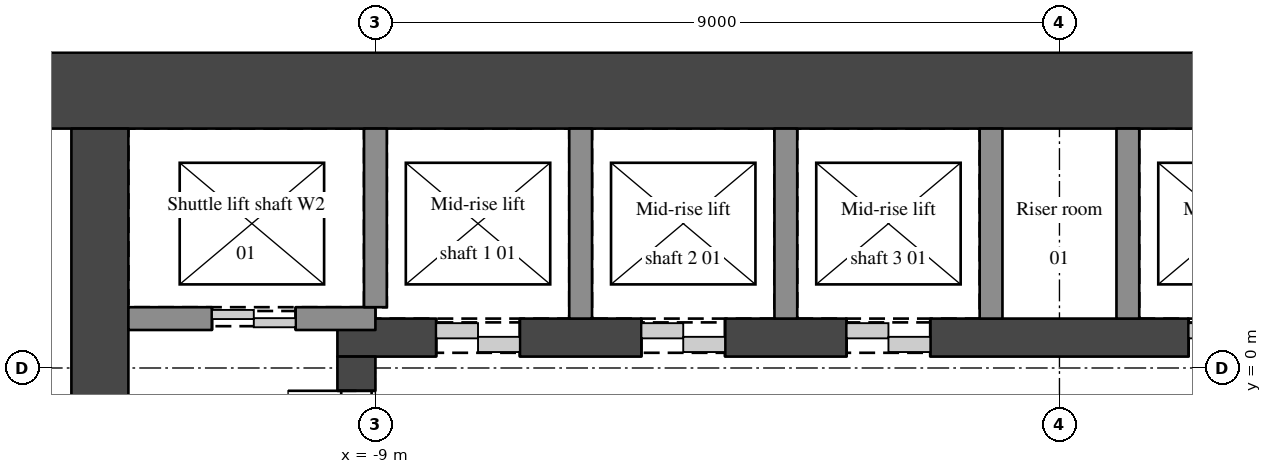
"""IFC4 building model, lengths in metres.
Left out: names, types, materials, properties, quantities, classifications, styles, units other than length and angle.
Written with IfcOpenShell. Run it as: python <this file> out.ifc"""

import sys

from ifc_helpers import new_model, si_unit, direction, frame, frame_2d, origin, place, context, subcontext, project, spatial, rectangle, extrude, element, fill, save


model = new_model("IFC4")
c1 = context("Model", 3, precision=1e-05, world=origin(), true_north=direction((0.0, 1.0)))
c2 = subcontext(c1, "Body", "Model", "MODEL_VIEW")
j1 = project(units=[si_unit("LENGTHUNIT", "METRE"), si_unit("PLANEANGLEUNIT", "RADIAN")], contexts=[c1])
p1 = place(None, origin())
s1 = spatial("IfcSite", under=j1, at=p1, CompositionType="ELEMENT")
p2 = place(p1, origin())
s2 = spatial("IfcBuilding", under=s1, at=p2, CompositionType="ELEMENT")
p3 = place(p2, frame((0.0, 0.0, 108.9)))
s3 = spatial("IfcBuildingStorey", under=s2, at=p3, CompositionType="ELEMENT", Elevation=108.9)
p4 = place(p3, frame((-15.0, 3.65, 0.0), z_axis=(0.0, 0.0, 1.0), x_axis=(1.0, 0.0, 0.0)))
e1 = element("IfcWall", 1, at=p4, inside=s3, PredefinedType="SHEAR", context=c2, shape_type="SweptSolid", body=[
    extrude(rectangle(XDim=30.0, YDim=1.0, at=frame_2d((15.0, 0.0))), origin(), (0.0, 0.0, 1.0), 5.4),
])
p5 = place(p3, frame((-12.625, -11.5, 0.0), z_axis=(0.0, 0.0, 1.0), x_axis=(0.0, 1.0, 0.0)))
e2 = element("IfcWall", 2, at=p5, inside=s3, PredefinedType="SHEAR", context=c2, shape_type="SweptSolid", body=[
    extrude(rectangle(XDim=14.65, YDim=0.75, at=frame_2d((7.325, 0.0))), origin(), (0.0, 0.0, 1.0), 5.4),
])
p6 = place(p5, frame((10.05, 0.0, 0.0)))
e3 = element("IfcOpeningElement", 3, at=p6, cuts=e2, PredefinedType="OPENING", context=c2, shape_type="SweptSolid", body=[
    extrude(rectangle(XDim=0.9, YDim=2.1, at=frame_2d((0.45, 1.05))), frame((0.0, 0.385, 0.0), z_axis=(0.0, -1.0, 0.0), x_axis=(1.0, 0.0, 0.0)), (0.0, 0.0, 1.0), 0.77),
])
p7 = place(p3, frame((-9.5, 0.4, 0.0), z_axis=(0.0, 0.0, 1.0), x_axis=(1.0, 0.0, 0.0)))
e4 = element("IfcWall", 4, at=p7, inside=s3, PredefinedType="SHEAR", context=c2, shape_type="SweptSolid", body=[
    extrude(rectangle(XDim=19.0, YDim=0.5, at=frame_2d((9.5, 0.0))), origin(), (0.0, 0.0, 1.0), 5.4),
])
p8 = place(p7, frame((1.3, 0.0, 0.0)))
e5 = element("IfcOpeningElement", 5, at=p8, cuts=e4, PredefinedType="OPENING", context=c2, shape_type="SweptSolid", body=[
    extrude(rectangle(XDim=1.1, YDim=2.1, at=frame_2d((0.55, 1.05))), frame((0.0, 0.26, 0.0), z_axis=(0.0, -1.0, 0.0), x_axis=(1.0, 0.0, 0.0)), (0.0, 0.0, 1.0), 0.52),
])
p9 = place(p7, frame((4.0, 0.0, 0.0)))
e6 = element("IfcOpeningElement", 6, at=p9, cuts=e4, PredefinedType="OPENING", context=c2, shape_type="SweptSolid", body=[
    extrude(rectangle(XDim=1.1, YDim=2.1, at=frame_2d((0.55, 1.05))), frame((0.0, 0.26, 0.0), z_axis=(0.0, -1.0, 0.0), x_axis=(1.0, 0.0, 0.0)), (0.0, 0.0, 1.0), 0.52),
])
p10 = place(p7, frame((6.7, 0.0, 0.0)))
e7 = element("IfcOpeningElement", 7, at=p10, cuts=e4, PredefinedType="OPENING", context=c2, shape_type="SweptSolid", body=[
    extrude(rectangle(XDim=1.1, YDim=2.1, at=frame_2d((0.55, 1.05))), frame((0.0, 0.26, 0.0), z_axis=(0.0, -1.0, 0.0), x_axis=(1.0, 0.0, 0.0)), (0.0, 0.0, 1.0), 0.52),
])
p11 = place(p7, frame((11.2, 0.0, 0.0)))
e8 = element("IfcOpeningElement", 8, at=p11, cuts=e4, PredefinedType="OPENING", context=c2, shape_type="SweptSolid", body=[
    extrude(rectangle(XDim=1.1, YDim=2.1, at=frame_2d((0.55, 1.05))), frame((0.0, 0.26, 0.0), z_axis=(0.0, -1.0, 0.0), x_axis=(1.0, 0.0, 0.0)), (0.0, 0.0, 1.0), 0.52),
])
p12 = place(p7, frame((13.9, 0.0, 0.0)))
e9 = element("IfcOpeningElement", 9, at=p12, cuts=e4, PredefinedType="OPENING", context=c2, shape_type="SweptSolid", body=[
    extrude(rectangle(XDim=1.1, YDim=2.1, at=frame_2d((0.55, 1.05))), frame((0.0, 0.26, 0.0), z_axis=(0.0, -1.0, 0.0), x_axis=(1.0, 0.0, 0.0)), (0.0, 0.0, 1.0), 0.52),
])
p13 = place(p7, frame((16.6, 0.0, 0.0)))
e10 = element("IfcOpeningElement", 10, at=p13, cuts=e4, PredefinedType="OPENING", context=c2, shape_type="SweptSolid", body=[
    extrude(rectangle(XDim=1.1, YDim=2.1, at=frame_2d((0.55, 1.05))), frame((0.0, 0.26, 0.0), z_axis=(0.0, -1.0, 0.0), x_axis=(1.0, 0.0, 0.0)), (0.0, 0.0, 1.0), 0.52),
])
p14 = place(p3, frame((-9.25, -11.5, 0.0), z_axis=(0.0, 0.0, 1.0), x_axis=(0.0, 1.0, 0.0)))
e11 = element("IfcWall", 11, at=p14, inside=s3, PredefinedType="SHEAR", context=c2, shape_type="SweptSolid", body=[
    extrude(rectangle(XDim=11.65, YDim=0.5, at=frame_2d((5.825, 0.0))), origin(), (0.0, 0.0, 1.0), 5.4),
])
p15 = place(p14, frame((9.4, 0.0, 0.0)))
e12 = element("IfcOpeningElement", 12, at=p15, cuts=e11, PredefinedType="OPENING", context=c2, shape_type="SweptSolid", body=[
    extrude(rectangle(XDim=1.8, YDim=2.1, at=frame_2d((0.9, 1.05))), frame((0.0, 0.26, 0.0), z_axis=(0.0, -1.0, 0.0), x_axis=(1.0, 0.0, 0.0)), (0.0, 0.0, 1.0), 0.52),
])
p16 = place(p14, frame((5.25, 0.0, 0.0)))
e13 = element("IfcOpeningElement", 13, at=p16, cuts=e11, PredefinedType="OPENING", context=c2, shape_type="SweptSolid", body=[
    extrude(rectangle(XDim=1.1, YDim=2.1, at=frame_2d((0.55, 1.05))), frame((0.0, 0.26, 0.0), z_axis=(0.0, -1.0, 0.0), x_axis=(1.0, 0.0, 0.0)), (0.0, 0.0, 1.0), 0.52),
])
p17 = place(p3, frame((-9.0, 0.65, 0.0), z_axis=(0.0, 0.0, 1.0), x_axis=(-1.0, 0.0, 0.0)))
e14 = element("IfcWall", 14, at=p17, inside=s3, PredefinedType="SHEAR", context=c2, shape_type="SweptSolid", body=[
    extrude(rectangle(XDim=3.25, YDim=0.3, at=frame_2d((1.625, 0.0))), origin(), (0.0, 0.0, 1.0), 5.4),
])
p18 = place(p17, frame((1.05, 0.0, 0.0)))
e15 = element("IfcOpeningElement", 15, at=p18, cuts=e14, PredefinedType="OPENING", context=c2, shape_type="SweptSolid", body=[
    extrude(rectangle(XDim=1.1, YDim=2.1, at=frame_2d((0.55, 1.05))), frame((0.0, 0.16, 0.0), z_axis=(0.0, -1.0, 0.0), x_axis=(1.0, 0.0, 0.0)), (0.0, 0.0, 1.0), 0.32),
])
p19 = place(p3, frame((-9.0, 0.8, 0.0), z_axis=(0.0, 0.0, 1.0), x_axis=(0.0, 1.0, 0.0)))
e16 = element("IfcWall", 16, at=p19, inside=s3, PredefinedType="SHEAR", context=c2, shape_type="SweptSolid", body=[
    extrude(rectangle(XDim=2.35, YDim=0.3, at=frame_2d((1.175, 0.0))), origin(), (0.0, 0.0, 1.0), 5.4),
])
for number, where, z_axis, x_axis in (
    (17, (-6.3, 0.65, 0.0), (0.0, 0.0, 1.0), (0.0, 1.0, 0.0)),
    (18, (-3.6, 0.65, 0.0), (0.0, 0.0, 1.0), (0.0, 1.0, 0.0)),
    (19, (-0.9, 0.65, 0.0), (0.0, 0.0, 1.0), (0.0, 1.0, 0.0)),
    (20, (0.9, 0.65, 0.0), (0.0, 0.0, 1.0), (0.0, 1.0, 0.0)),
):
    element("IfcWall", number, at=place(p3, frame(where, z_axis=z_axis, x_axis=x_axis)), inside=s3, PredefinedType="SHEAR", context=c2, shape_type="SweptSolid", body=[
        extrude(rectangle(XDim=2.5, YDim=0.3, at=frame_2d((1.25, 0.0))), origin(), (0.0, 0.0, 1.0), 5.4),
    ])
p20 = place(p15, origin())
e21 = element("IfcDoor", 21, at=p20, inside=s3, OperationType="DOUBLE_DOOR_SINGLE_SWING", PredefinedType="DOOR", context=c2, shape_type="SweptSolid", body=[
    extrude(rectangle(XDim=1.8, YDim=2.1, at=frame_2d((0.9, 1.05))), frame((0.0, 0.025, 0.0), z_axis=(0.0, -1.0, 0.0), x_axis=(1.0, 0.0, 0.0)), (0.0, 0.0, 1.0), 0.05),
])
fill(e12, e21)
p21 = place(p8, origin())
e22 = element("IfcDoor", 22, at=p21, inside=s3, OperationType="DOUBLE_DOOR_SLIDING", PredefinedType="DOOR", context=c2, shape_type="SweptSolid", body=[
    extrude(rectangle(XDim=1.1, YDim=2.1, at=frame_2d((0.55, 1.05))), frame((0.0, 0.025, 0.0), z_axis=(0.0, -1.0, 0.0), x_axis=(1.0, 0.0, 0.0)), (0.0, 0.0, 1.0), 0.05),
])
fill(e5, e22)
p22 = place(p9, origin())
e23 = element("IfcDoor", 23, at=p22, inside=s3, OperationType="DOUBLE_DOOR_SLIDING", PredefinedType="DOOR", context=c2, shape_type="SweptSolid", body=[
    extrude(rectangle(XDim=1.1, YDim=2.1, at=frame_2d((0.55, 1.05))), frame((0.0, 0.025, 0.0), z_axis=(0.0, -1.0, 0.0), x_axis=(1.0, 0.0, 0.0)), (0.0, 0.0, 1.0), 0.05),
])
fill(e6, e23)
p23 = place(p10, origin())
e24 = element("IfcDoor", 24, at=p23, inside=s3, OperationType="DOUBLE_DOOR_SLIDING", PredefinedType="DOOR", context=c2, shape_type="SweptSolid", body=[
    extrude(rectangle(XDim=1.1, YDim=2.1, at=frame_2d((0.55, 1.05))), frame((0.0, 0.025, 0.0), z_axis=(0.0, -1.0, 0.0), x_axis=(1.0, 0.0, 0.0)), (0.0, 0.0, 1.0), 0.05),
])
fill(e7, e24)
p24 = place(p11, origin())
e25 = element("IfcDoor", 25, at=p24, inside=s3, OperationType="DOUBLE_DOOR_SLIDING", PredefinedType="DOOR", context=c2, shape_type="SweptSolid", body=[
    extrude(rectangle(XDim=1.1, YDim=2.1, at=frame_2d((0.55, 1.05))), frame((0.0, 0.025, 0.0), z_axis=(0.0, -1.0, 0.0), x_axis=(1.0, 0.0, 0.0)), (0.0, 0.0, 1.0), 0.05),
])
fill(e8, e25)
p25 = place(p18, origin())
e26 = element("IfcDoor", 26, at=p25, inside=s3, OperationType="DOUBLE_DOOR_SLIDING", PredefinedType="DOOR", context=c2, shape_type="SweptSolid", body=[
    extrude(rectangle(XDim=1.1, YDim=2.1, at=frame_2d((0.55, 1.05))), frame((0.0, 0.025, 0.0), z_axis=(0.0, -1.0, 0.0), x_axis=(1.0, 0.0, 0.0)), (0.0, 0.0, 1.0), 0.05),
])
fill(e15, e26)
save(model, sys.argv[1])
